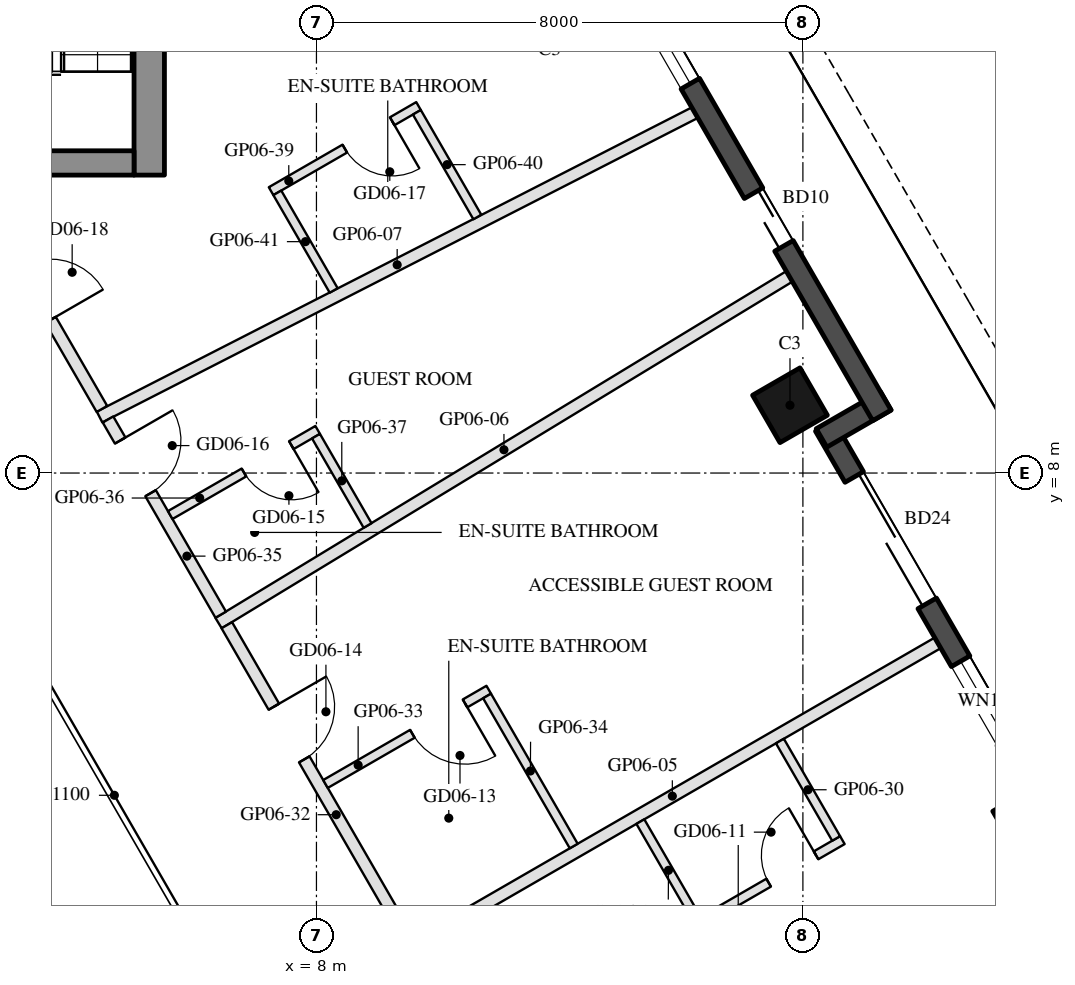
"""IFC4 building model, lengths in metres.
Left out: names, types, materials, properties, quantities, classifications, styles, units other than length and angle.
Written with IfcOpenShell. Run it as: python <this file> out.ifc"""

import sys

from ifc_helpers import new_model, si_unit, direction, frame, frame_2d, origin, origin_2d, place, context, subcontext, project, spatial, rectangle, hollow_rectangle, extrude, element, fill, save


model = new_model("IFC4")
c1 = context("Model", 3, precision=1e-05, world=origin(), true_north=direction((0.0, 1.0)))
c2 = subcontext(c1, "Body", "Model", "MODEL_VIEW")
j1 = project(units=[si_unit("LENGTHUNIT", "METRE"), si_unit("PLANEANGLEUNIT", "RADIAN")], contexts=[c1])
p1 = place(None, origin())
s1 = spatial("IfcSite", under=j1, at=p1, CompositionType="ELEMENT")
p2 = place(p1, origin())
s2 = spatial("IfcBuilding", under=s1, at=p2, CompositionType="ELEMENT")
p3 = place(p2, frame((0.0, 0.0, 90.9)))
s3 = spatial("IfcBuildingStorey", under=s2, at=p3, CompositionType="ELEMENT", Elevation=90.9)
for number, where, z_axis, x_axis in (
    (1, (19.738, 2.273, 0.0), (0.0, 0.0, 1.0), (-0.5, 0.866, 0.0)),
    (2, (15.788, 9.115, 0.0), (0.0, 0.0, 1.0), (-0.5, 0.866, 0.0)),
):
    element("IfcColumn", number, at=place(p3, frame(where, z_axis=z_axis, x_axis=x_axis)), inside=s3, PredefinedType="COLUMN", context=c2, shape_type="SweptSolid", body=[
        extrude(hollow_rectangle(XDim=0.9, YDim=0.9, WallThickness=0.04, at=origin_2d()), origin(), (0.0, 0.0, 1.0), 3.7),
    ])
p4 = place(p3, frame((19.729, 2.938, 0.0), z_axis=(0.0, 0.0, 1.0), x_axis=(-0.499976430342, 0.866039011305, 0.0)))
e3 = element("IfcWall", 3, at=p4, inside=s3, PredefinedType="SOLIDWALL", context=c2, shape_type="SweptSolid", body=[
    extrude(rectangle(XDim=6.74, YDim=0.35, at=frame_2d((3.37, 0.0))), origin(), (0.0, 0.0, 1.0), 3.55),
])
p5 = place(p4, frame((0.77, 0.0, 0.3)))
e4 = element("IfcOpeningElement", 4, at=p5, cuts=e3, PredefinedType="OPENING", context=c2, shape_type="SweptSolid", body=[
    extrude(rectangle(XDim=1.5, YDim=2.65, at=frame_2d((0.75, 1.325))), frame((0.0, 0.185, 0.0), z_axis=(0.0, -1.0, 0.0), x_axis=(1.0, 0.0, 0.0)), (0.0, 0.0, 1.0), 0.37),
])
p6 = place(p4, frame((3.37, 0.0, 0.0)))
e5 = element("IfcOpeningElement", 5, at=p6, cuts=e3, PredefinedType="OPENING", context=c2, shape_type="SweptSolid", body=[
    extrude(rectangle(XDim=2.4, YDim=2.4, at=frame_2d((1.2, 1.2))), frame((0.0, 0.185, 0.0), z_axis=(0.0, -1.0, 0.0), x_axis=(1.0, 0.0, 0.0)), (0.0, 0.0, 1.0), 0.37),
])
p7 = place(p3, frame((16.306, 8.577, 0.0), z_axis=(0.0, 0.0, 1.0), x_axis=(0.866092288191, 0.499884134912, 0.0)))
e6 = element("IfcWall", 6, at=p7, inside=s3, PredefinedType="SOLIDWALL", context=c2, shape_type="SweptSolid", body=[
    extrude(rectangle(XDim=1.22, YDim=0.35, at=frame_2d((0.61, 0.0))), origin(), (0.0, 0.0, 1.0), 3.55),
])
p8 = place(p3, frame((17.299, 8.948, 0.0), z_axis=(0.0, 0.0, 1.0), x_axis=(-0.500010041276, 0.866019606374, 0.0)))
e7 = element("IfcWall", 7, at=p8, inside=s3, PredefinedType="SOLIDWALL", context=c2, shape_type="SweptSolid", body=[
    extrude(rectangle(XDim=9.7, YDim=0.35, at=frame_2d((4.85, 0.0))), origin(), (0.0, 0.0, 1.0), 3.55),
])
p9 = place(p8, frame((3.22, 0.0, 0.0)))
e8 = element("IfcOpeningElement", 8, at=p9, cuts=e7, PredefinedType="OPENING", context=c2, shape_type="SweptSolid", body=[
    extrude(rectangle(XDim=1.0, YDim=2.4, at=frame_2d((0.5, 1.2))), frame((0.0, 0.185, 0.0), z_axis=(0.0, -1.0, 0.0), x_axis=(1.0, 0.0, 0.0)), (0.0, 0.0, 1.0), 0.37),
])
p10 = place(p8, frame((6.3, 0.0, 0.3)))
e9 = element("IfcOpeningElement", 9, at=p10, cuts=e7, PredefinedType="OPENING", context=c2, shape_type="SweptSolid", body=[
    extrude(rectangle(XDim=1.6, YDim=2.65, at=frame_2d((0.8, 1.325))), frame((0.0, 0.185, 0.0), z_axis=(0.0, -1.0, 0.0), x_axis=(1.0, 0.0, 0.0)), (0.0, 0.0, 1.0), 0.37),
])
p11 = place(p3, frame((5.25, 12.9, 0.0), z_axis=(0.0, 0.0, 1.0), x_axis=(0.0, 1.0, 0.0)))
e10 = element("IfcWall", 10, at=p11, inside=s3, PredefinedType="SHEAR", context=c2, shape_type="SweptSolid", body=[
    extrude(rectangle(XDim=14.837, YDim=0.5, at=frame_2d((7.418, 0.0))), origin(), (0.0, 0.0, 1.0), 3.5),
])
p12 = place(p3, frame((5.0, 13.1, 0.0), z_axis=(0.0, 0.0, 1.0), x_axis=(-1.0, 0.0, 0.0)))
e11 = element("IfcWall", 11, at=p12, inside=s3, PredefinedType="SHEAR", context=c2, shape_type="SweptSolid", body=[
    extrude(rectangle(XDim=10.0, YDim=0.4, at=frame_2d((5.0, 0.0))), origin(), (0.0, 0.0, 1.0), 3.5),
])
p13 = place(p12, frame((3.55, 0.0, 0.0)))
e12 = element("IfcOpeningElement", 12, at=p13, cuts=e11, PredefinedType="OPENING", context=c2, shape_type="SweptSolid", body=[
    extrude(rectangle(XDim=1.1, YDim=2.1, at=frame_2d((0.55, 1.05))), frame((0.0, 0.21, 0.0), z_axis=(0.0, -1.0, 0.0), x_axis=(1.0, 0.0, 0.0)), (0.0, 0.0, 1.0), 0.42),
])
p14 = place(p12, frame((5.85, 0.0, 0.0)))
e13 = element("IfcOpeningElement", 13, at=p14, cuts=e11, PredefinedType="OPENING", context=c2, shape_type="SweptSolid", body=[
    extrude(rectangle(XDim=1.4, YDim=2.1, at=frame_2d((0.7, 1.05))), frame((0.0, 0.21, 0.0), z_axis=(0.0, -1.0, 0.0), x_axis=(1.0, 0.0, 0.0)), (0.0, 0.0, 1.0), 0.42),
])
p15 = place(p3, frame((18.218, 5.206, 0.0), z_axis=(0.0, 0.0, 1.0), x_axis=(-0.866022637375, -0.500004791531, 0.0)))
e14 = element("IfcWall", 14, at=p15, inside=s3, PredefinedType="PARTITIONING", context=c2, shape_type="SweptSolid", body=[
    extrude(rectangle(XDim=10.08, YDim=0.2, at=frame_2d((5.04, 0.0))), origin(), (0.0, 0.0, 1.0), 2.96),
])
p16 = place(p3, frame((15.777, 11.233, 0.0), z_axis=(0.0, 0.0, 1.0), x_axis=(-0.854689239939, -0.519139964877, 0.0)))
e15 = element("IfcWall", 15, at=p16, inside=s3, PredefinedType="PARTITIONING", context=c2, shape_type="SweptSolid", body=[
    extrude(rectangle(XDim=10.983, YDim=0.2, at=frame_2d((5.491, 0.0))), origin(), (0.0, 0.0, 1.0), 2.96),
])
p17 = place(p3, frame((14.222, 13.927, 0.0), z_axis=(0.0, 0.0, 1.0), x_axis=(-0.890385282198, -0.455207699017, 0.0)))
e16 = element("IfcWall", 16, at=p17, inside=s3, PredefinedType="PARTITIONING", context=c2, shape_type="SweptSolid", body=[
    extrude(rectangle(XDim=10.994, YDim=0.2, at=frame_2d((5.497, 0.0))), origin(), (0.0, 0.0, 1.0), 2.96),
])
p18 = place(p3, frame((14.224, 0.562, 0.0), z_axis=(0.0, 0.0, 1.0), x_axis=(0.866018616679, 0.500011755427, 0.0)))
e17 = element("IfcWall", 17, at=p18, inside=s3, PredefinedType="PARTITIONING", context=c2, shape_type="SweptSolid", body=[
    extrude(rectangle(XDim=2.8, YDim=0.15, at=frame_2d((1.4, 0.0))), origin(), (0.0, 0.0, 1.0), 3.55),
])
p19 = place(p18, frame((1.4, 0.0, 0.0)))
e18 = element("IfcOpeningElement", 18, at=p19, cuts=e17, PredefinedType="OPENING", context=c2, shape_type="SweptSolid", body=[
    extrude(rectangle(XDim=0.9, YDim=2.1, at=frame_2d((0.45, 1.05))), frame((0.0, 0.085, 0.0), z_axis=(0.0, -1.0, 0.0), x_axis=(1.0, 0.0, 0.0)), (0.0, 0.0, 1.0), 0.17),
])
p20 = place(p3, frame((16.547, 1.99, 0.0), z_axis=(0.0, 0.0, 1.0), x_axis=(-0.499985172903, 0.866033964044, 0.0)))
e19 = element("IfcWall", 19, at=p20, inside=s3, PredefinedType="PARTITIONING", context=c2, shape_type="SweptSolid", body=[
    extrude(rectangle(XDim=1.85, YDim=0.15, at=frame_2d((0.925, 0.0))), origin(), (0.0, 0.0, 1.0), 3.55),
])
p21 = place(p3, frame((14.252, 0.665, 0.0), z_axis=(0.0, 0.0, 1.0), x_axis=(-0.500042316284, 0.866000971088, 0.0)))
e20 = element("IfcWall", 20, at=p21, inside=s3, PredefinedType="PARTITIONING", context=c2, shape_type="SweptSolid", body=[
    extrude(rectangle(XDim=1.85, YDim=0.15, at=frame_2d((0.925, 0.0))), origin(), (0.0, 0.0, 1.0), 3.55),
])
p22 = place(p3, frame((6.526, 5.497, 0.0), z_axis=(0.0, 0.0, 1.0), x_axis=(0.500026652407, -0.866010015463, 0.0)))
e21 = element("IfcWall", 21, at=p22, inside=s3, PredefinedType="PARTITIONING", context=c2, shape_type="SweptSolid", body=[
    extrude(rectangle(XDim=5.998, YDim=0.2, at=frame_2d((2.999, 0.0))), origin(), (0.0, 0.0, 1.0), 2.95),
])
p23 = place(p22, frame((1.548, 0.0, 0.0)))
e22 = element("IfcOpeningElement", 22, at=p23, cuts=e21, PredefinedType="OPENING", context=c2, shape_type="SweptSolid", body=[
    extrude(rectangle(XDim=1.0, YDim=2.1, at=frame_2d((0.5, 1.05))), frame((0.0, 0.11, 0.0), z_axis=(0.0, -1.0, 0.0), x_axis=(1.0, 0.0, 0.0)), (0.0, 0.0, 1.0), 0.22),
])
p24 = place(p3, frame((10.833, 4.436, 0.0), z_axis=(0.0, 0.0, 1.0), x_axis=(-0.86602952684, -0.49999285859, 0.0)))
e23 = element("IfcWall", 23, at=p24, inside=s3, PredefinedType="PARTITIONING", context=c2, shape_type="SweptSolid", body=[
    extrude(rectangle(XDim=3.1, YDim=0.15, at=frame_2d((1.55, 0.0))), origin(), (0.0, 0.0, 1.0), 3.55),
])
p25 = place(p24, frame((0.45, 0.0, 0.0)))
e24 = element("IfcOpeningElement", 24, at=p25, cuts=e23, PredefinedType="OPENING", context=c2, shape_type="SweptSolid", body=[
    extrude(rectangle(XDim=1.0, YDim=2.1, at=frame_2d((0.5, 1.05))), frame((0.0, 0.085, 0.0), z_axis=(0.0, -1.0, 0.0), x_axis=(1.0, 0.0, 0.0)), (0.0, 0.0, 1.0), 0.17),
])
p26 = place(p3, frame((12.231, 1.865, 0.0), z_axis=(0.0, 0.0, 1.0), x_axis=(-0.500036373335, 0.866004402611, 0.0)))
e25 = element("IfcWall", 25, at=p26, inside=s3, PredefinedType="PARTITIONING", context=c2, shape_type="SweptSolid", body=[
    extrude(rectangle(XDim=2.85, YDim=0.15, at=frame_2d((1.425, 0.0))), origin(), (0.0, 0.0, 1.0), 2.95),
])
p27 = place(p3, frame((4.572, 8.881, 0.0), z_axis=(0.0, 0.0, 1.0), x_axis=(0.500041684057, -0.866001336145, 0.0)))
e26 = element("IfcWall", 26, at=p27, inside=s3, PredefinedType="PARTITIONING", context=c2, shape_type="SweptSolid", body=[
    extrude(rectangle(XDim=3.707, YDim=0.2, at=frame_2d((1.854, 0.0))), origin(), (0.0, 0.0, 1.0), 2.95),
])
p28 = place(p27, frame((0.4, 0.0, 0.0)))
e27 = element("IfcOpeningElement", 27, at=p28, cuts=e26, PredefinedType="OPENING", context=c2, shape_type="SweptSolid", body=[
    extrude(rectangle(XDim=1.0, YDim=2.1, at=frame_2d((0.5, 1.05))), frame((0.0, 0.11, 0.0), z_axis=(0.0, -1.0, 0.0), x_axis=(1.0, 0.0, 0.0)), (0.0, 0.0, 1.0), 0.22),
])
p29 = place(p3, frame((8.02, 8.709, 0.0), z_axis=(0.0, 0.0, 1.0), x_axis=(-0.866034573852, -0.49998411664, 0.0)))
e28 = element("IfcWall", 28, at=p29, inside=s3, PredefinedType="PARTITIONING", context=c2, shape_type="SweptSolid", body=[
    extrude(rectangle(XDim=2.8, YDim=0.15, at=frame_2d((1.4, 0.0))), origin(), (0.0, 0.0, 1.0), 3.55),
])
p30 = place(p29, frame((0.5, 0.0, 0.0)))
e29 = element("IfcOpeningElement", 29, at=p30, cuts=e28, PredefinedType="OPENING", context=c2, shape_type="SweptSolid", body=[
    extrude(rectangle(XDim=0.9, YDim=2.1, at=frame_2d((0.45, 1.05))), frame((0.0, 0.085, 0.0), z_axis=(0.0, -1.0, 0.0), x_axis=(1.0, 0.0, 0.0)), (0.0, 0.0, 1.0), 0.17),
])
p31 = place(p3, frame((8.841, 7.137, 0.0), z_axis=(0.0, 0.0, 1.0), x_axis=(-0.500054617923, 0.865993867816, 0.0)))
e30 = element("IfcWall", 30, at=p31, inside=s3, PredefinedType="PARTITIONING", context=c2, shape_type="SweptSolid", body=[
    extrude(rectangle(XDim=1.697, YDim=0.15, at=frame_2d((0.848, 0.0))), origin(), (0.0, 0.0, 1.0), 3.55),
])
p32 = place(p3, frame((2.281, 12.85, 0.0), z_axis=(0.0, 0.0, 1.0), x_axis=(0.499973180286, -0.8660408876, 0.0)))
e31 = element("IfcWall", 31, at=p32, inside=s3, PredefinedType="PARTITIONING", context=c2, shape_type="SweptSolid", body=[
    extrude(rectangle(XDim=4.383, YDim=0.2, at=frame_2d((2.191, 0.0))), origin(), (0.0, 0.0, 1.0), 2.95),
])
p33 = place(p32, frame((1.691, 0.0, 0.0)))
e32 = element("IfcOpeningElement", 32, at=p33, cuts=e31, PredefinedType="OPENING", context=c2, shape_type="SweptSolid", body=[
    extrude(rectangle(XDim=1.0, YDim=2.1, at=frame_2d((0.5, 1.05))), frame((0.0, 0.11, 0.0), z_axis=(0.0, -1.0, 0.0), x_axis=(1.0, 0.0, 0.0)), (0.0, 0.0, 1.0), 0.22),
])
p34 = place(p3, frame((9.679, 14.036, 0.0), z_axis=(0.0, 0.0, 1.0), x_axis=(-0.865996816683, -0.500049511043, 0.0)))
e33 = element("IfcWall", 33, at=p34, inside=s3, PredefinedType="PARTITIONING", context=c2, shape_type="SweptSolid", body=[
    extrude(rectangle(XDim=2.8, YDim=0.15, at=frame_2d((1.4, 0.0))), origin(), (0.0, 0.0, 1.0), 3.55),
])
p35 = place(p34, frame((0.5, 0.0, 0.0)))
e34 = element("IfcOpeningElement", 34, at=p35, cuts=e33, PredefinedType="OPENING", context=c2, shape_type="SweptSolid", body=[
    extrude(rectangle(XDim=0.9, YDim=2.1, at=frame_2d((0.45, 1.05))), frame((0.0, 0.085, 0.0), z_axis=(0.0, -1.0, 0.0), x_axis=(1.0, 0.0, 0.0)), (0.0, 0.0, 1.0), 0.17),
])
p36 = place(p3, frame((10.646, 12.211, 0.0), z_axis=(0.0, 0.0, 1.0), x_axis=(-0.50001992892, 0.866013897511, 0.0)))
e35 = element("IfcWall", 35, at=p36, inside=s3, PredefinedType="PARTITIONING", context=c2, shape_type="SweptSolid", body=[
    extrude(rectangle(XDim=1.989, YDim=0.15, at=frame_2d((0.995, 0.0))), origin(), (0.0, 0.0, 1.0), 3.55),
])
p37 = place(p3, frame((8.283, 11.003, 0.0), z_axis=(0.0, 0.0, 1.0), x_axis=(-0.499935264145, 0.866062775822, 0.0)))
e36 = element("IfcWall", 36, at=p37, inside=s3, PredefinedType="PARTITIONING", context=c2, shape_type="SweptSolid", body=[
    extrude(rectangle(XDim=1.854, YDim=0.15, at=frame_2d((0.927, 0.0))), origin(), (0.0, 0.0, 1.0), 3.55),
])
p38 = place(p5, origin())
e37 = element("IfcWindow", 37, at=p38, inside=s3, PartitioningType="SINGLE_PANEL", PredefinedType="WINDOW", context=c2, shape_type="SweptSolid", body=[
    extrude(rectangle(XDim=1.5, YDim=2.65, at=frame_2d((0.75, 1.325))), frame((0.0, 0.03, 0.0), z_axis=(0.0, -1.0, 0.0), x_axis=(1.0, 0.0, 0.0)), (0.0, 0.0, 1.0), 0.06),
])
fill(e4, e37)
p39 = place(p6, frame((2.4, 0.0, 0.0), z_axis=(0.0, 0.0, 1.0), x_axis=(-1.0, 0.0, 0.0)))
e38 = element("IfcDoor", 38, at=p39, inside=s3, OperationType="SLIDING_TO_LEFT", PredefinedType="DOOR", context=c2, shape_type="SweptSolid", body=[
    extrude(rectangle(XDim=2.4, YDim=2.4, at=frame_2d((1.2, 1.2))), frame((0.0, 0.025, 0.0), z_axis=(0.0, -1.0, 0.0), x_axis=(1.0, 0.0, 0.0)), (0.0, 0.0, 1.0), 0.05),
])
fill(e5, e38)
p40 = place(p9, frame((1.0, 0.0, 0.0), z_axis=(0.0, 0.0, 1.0), x_axis=(-1.0, 0.0, 0.0)))
e39 = element("IfcDoor", 39, at=p40, inside=s3, OperationType="SLIDING_TO_LEFT", PredefinedType="DOOR", context=c2, shape_type="SweptSolid", body=[
    extrude(rectangle(XDim=1.0, YDim=2.4, at=frame_2d((0.5, 1.2))), frame((0.0, 0.025, 0.0), z_axis=(0.0, -1.0, 0.0), x_axis=(1.0, 0.0, 0.0)), (0.0, 0.0, 1.0), 0.05),
])
fill(e8, e39)
p41 = place(p10, origin())
e40 = element("IfcWindow", 40, at=p41, inside=s3, PartitioningType="SINGLE_PANEL", PredefinedType="WINDOW", context=c2, shape_type="SweptSolid", body=[
    extrude(rectangle(XDim=1.6, YDim=2.65, at=frame_2d((0.8, 1.325))), frame((0.0, 0.03, 0.0), z_axis=(0.0, -1.0, 0.0), x_axis=(1.0, 0.0, 0.0)), (0.0, 0.0, 1.0), 0.06),
])
fill(e9, e40)
p42 = place(p19, origin())
e41 = element("IfcDoor", 41, at=p42, inside=s3, OperationType="SINGLE_SWING_RIGHT", PredefinedType="DOOR", context=c2, shape_type="SweptSolid", body=[
    extrude(rectangle(XDim=0.9, YDim=2.1, at=frame_2d((0.45, 1.05))), frame((0.0, 0.025, 0.0), z_axis=(0.0, -1.0, 0.0), x_axis=(1.0, 0.0, 0.0)), (0.0, 0.0, 1.0), 0.05),
])
fill(e18, e41)
p43 = place(p25, origin())
e42 = element("IfcDoor", 42, at=p43, inside=s3, OperationType="SINGLE_SWING_LEFT", PredefinedType="DOOR", context=c2, shape_type="SweptSolid", body=[
    extrude(rectangle(XDim=1.0, YDim=2.1, at=frame_2d((0.5, 1.05))), frame((0.0, 0.025, 0.0), z_axis=(0.0, -1.0, 0.0), x_axis=(1.0, 0.0, 0.0)), (0.0, 0.0, 1.0), 0.05),
])
fill(e24, e42)
p44 = place(p23, origin())
e43 = element("IfcDoor", 43, at=p44, inside=s3, OperationType="SINGLE_SWING_LEFT", PredefinedType="DOOR", context=c2, shape_type="SweptSolid", body=[
    extrude(rectangle(XDim=1.0, YDim=2.1, at=frame_2d((0.5, 1.05))), frame((0.0, 0.025, 0.0), z_axis=(0.0, -1.0, 0.0), x_axis=(1.0, 0.0, 0.0)), (0.0, 0.0, 1.0), 0.05),
])
fill(e22, e43)
p45 = place(p30, origin())
e44 = element("IfcDoor", 44, at=p45, inside=s3, OperationType="SINGLE_SWING_LEFT", PredefinedType="DOOR", context=c2, shape_type="SweptSolid", body=[
    extrude(rectangle(XDim=0.9, YDim=2.1, at=frame_2d((0.45, 1.05))), frame((0.0, 0.025, 0.0), z_axis=(0.0, -1.0, 0.0), x_axis=(1.0, 0.0, 0.0)), (0.0, 0.0, 1.0), 0.05),
])
fill(e29, e44)
p46 = place(p28, origin())
e45 = element("IfcDoor", 45, at=p46, inside=s3, OperationType="SINGLE_SWING_LEFT", PredefinedType="DOOR", context=c2, shape_type="SweptSolid", body=[
    extrude(rectangle(XDim=1.0, YDim=2.1, at=frame_2d((0.5, 1.05))), frame((0.0, 0.025, 0.0), z_axis=(0.0, -1.0, 0.0), x_axis=(1.0, 0.0, 0.0)), (0.0, 0.0, 1.0), 0.05),
])
fill(e27, e45)
p47 = place(p35, origin())
e46 = element("IfcDoor", 46, at=p47, inside=s3, OperationType="SINGLE_SWING_LEFT", PredefinedType="DOOR", context=c2, shape_type="SweptSolid", body=[
    extrude(rectangle(XDim=0.9, YDim=2.1, at=frame_2d((0.45, 1.05))), frame((0.0, 0.025, 0.0), z_axis=(0.0, -1.0, 0.0), x_axis=(1.0, 0.0, 0.0)), (0.0, 0.0, 1.0), 0.05),
])
fill(e34, e46)
save(model, sys.argv[1])
